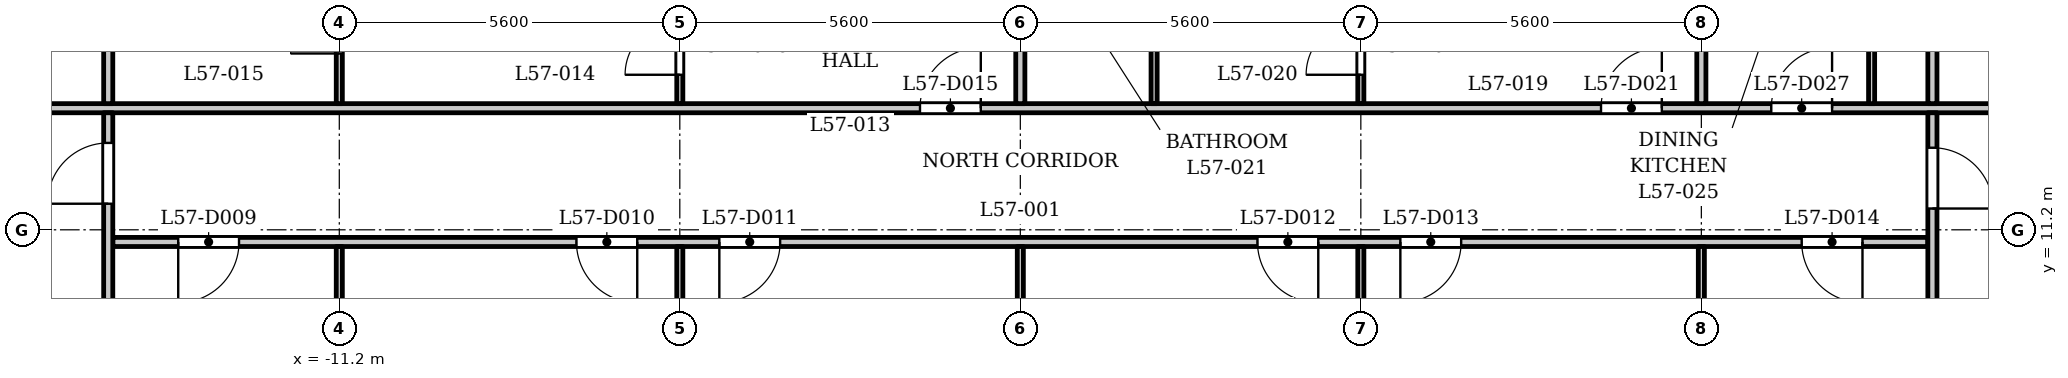
"""IFC4 building model, lengths in metres.
Left out: names, types, materials, properties, quantities, classifications, styles, units other than length and angle.
Written with IfcOpenShell. Run it as: python <this file> out.ifc"""

import sys

from ifc_helpers import new_model, si_unit, direction, frame, frame_2d, origin, place, context, subcontext, project, spatial, rectangle, extrude, element, fill, save


model = new_model("IFC4")
c1 = context("Model", 3, precision=1e-05, world=origin(), true_north=direction((0.0, 1.0)))
c2 = subcontext(c1, "Body", "Model", "MODEL_VIEW")
j1 = project(units=[si_unit("LENGTHUNIT", "METRE"), si_unit("PLANEANGLEUNIT", "RADIAN")], contexts=[c1])
p1 = place(None, origin())
s1 = spatial("IfcSite", under=j1, at=p1, CompositionType="ELEMENT")
p2 = place(p1, origin())
s2 = spatial("IfcBuilding", under=s1, at=p2, CompositionType="ELEMENT")
p3 = place(p2, frame((0.0, 0.0, 220.4)))
s3 = spatial("IfcBuildingStorey", under=s2, at=p3, CompositionType="ELEMENT", Elevation=220.4)
p4 = place(p3, frame((-14.925, 11.0, 0.0), z_axis=(0.0, 0.0, 1.0), x_axis=(1.0, 0.0, 0.0)))
e1 = element("IfcWall", 1, at=p4, inside=s3, PredefinedType="PARTITIONING", context=c2, shape_type="SweptSolid", body=[
    extrude(rectangle(XDim=29.85, YDim=0.15, at=frame_2d((14.925, 0.0))), origin(), (0.0, 0.0, 1.0), 3.2),
])
p5 = place(p4, frame((1.076, 0.0, 0.0)))
e2 = element("IfcOpeningElement", 2, at=p5, cuts=e1, PredefinedType="OPENING", context=c2, shape_type="SweptSolid", body=[
    extrude(rectangle(XDim=1.0, YDim=2.1, at=frame_2d((0.5, 1.05))), frame((0.0, 0.085, 0.0), z_axis=(0.0, -1.0, 0.0), x_axis=(1.0, 0.0, 0.0)), (0.0, 0.0, 1.0), 0.17),
])
p6 = place(p4, frame((7.625, 0.0, 0.0)))
e3 = element("IfcOpeningElement", 3, at=p6, cuts=e1, PredefinedType="OPENING", context=c2, shape_type="SweptSolid", body=[
    extrude(rectangle(XDim=1.0, YDim=2.1, at=frame_2d((0.5, 1.05))), frame((0.0, 0.085, 0.0), z_axis=(0.0, -1.0, 0.0), x_axis=(1.0, 0.0, 0.0)), (0.0, 0.0, 1.0), 0.17),
])
p7 = place(p4, frame((9.975, 0.0, 0.0)))
e4 = element("IfcOpeningElement", 4, at=p7, cuts=e1, PredefinedType="OPENING", context=c2, shape_type="SweptSolid", body=[
    extrude(rectangle(XDim=1.0, YDim=2.1, at=frame_2d((0.5, 1.05))), frame((0.0, 0.085, 0.0), z_axis=(0.0, -1.0, 0.0), x_axis=(1.0, 0.0, 0.0)), (0.0, 0.0, 1.0), 0.17),
])
p8 = place(p4, frame((18.825, 0.0, 0.0)))
e5 = element("IfcOpeningElement", 5, at=p8, cuts=e1, PredefinedType="OPENING", context=c2, shape_type="SweptSolid", body=[
    extrude(rectangle(XDim=1.0, YDim=2.1, at=frame_2d((0.5, 1.05))), frame((0.0, 0.085, 0.0), z_axis=(0.0, -1.0, 0.0), x_axis=(1.0, 0.0, 0.0)), (0.0, 0.0, 1.0), 0.17),
])
p9 = place(p4, frame((21.175, 0.0, 0.0)))
e6 = element("IfcOpeningElement", 6, at=p9, cuts=e1, PredefinedType="OPENING", context=c2, shape_type="SweptSolid", body=[
    extrude(rectangle(XDim=1.0, YDim=2.1, at=frame_2d((0.5, 1.05))), frame((0.0, 0.085, 0.0), z_axis=(0.0, -1.0, 0.0), x_axis=(1.0, 0.0, 0.0)), (0.0, 0.0, 1.0), 0.17),
])
p10 = place(p4, frame((27.775, 0.0, 0.0)))
e7 = element("IfcOpeningElement", 7, at=p10, cuts=e1, PredefinedType="OPENING", context=c2, shape_type="SweptSolid", body=[
    extrude(rectangle(XDim=1.0, YDim=2.1, at=frame_2d((0.5, 1.05))), frame((0.0, 0.085, 0.0), z_axis=(0.0, -1.0, 0.0), x_axis=(1.0, 0.0, 0.0)), (0.0, 0.0, 1.0), 0.17),
])
p11 = place(p3, frame((-17.4, 13.2, 0.0), z_axis=(0.0, 0.0, 1.0), x_axis=(1.0, 0.0, 0.0)))
e8 = element("IfcWall", 8, at=p11, inside=s3, PredefinedType="PARTITIONING", context=c2, shape_type="SweptSolid", body=[
    extrude(rectangle(XDim=34.8, YDim=0.15, at=frame_2d((17.4, 0.0))), origin(), (0.0, 0.0, 1.0), 3.2),
])
p12 = place(p11, frame((0.25, 0.0, 0.0)))
e9 = element("IfcOpeningElement", 9, at=p12, cuts=e8, PredefinedType="OPENING", context=c2, shape_type="SweptSolid", body=[
    extrude(rectangle(XDim=1.0, YDim=2.1, at=frame_2d((0.5, 1.05))), frame((0.0, 0.085, 0.0), z_axis=(0.0, -1.0, 0.0), x_axis=(1.0, 0.0, 0.0)), (0.0, 0.0, 1.0), 0.17),
])
p13 = place(p11, frame((33.65, 0.0, 0.0)))
e10 = element("IfcOpeningElement", 10, at=p13, cuts=e8, PredefinedType="OPENING", context=c2, shape_type="SweptSolid", body=[
    extrude(rectangle(XDim=1.0, YDim=2.1, at=frame_2d((0.5, 1.05))), frame((0.0, 0.085, 0.0), z_axis=(0.0, -1.0, 0.0), x_axis=(1.0, 0.0, 0.0)), (0.0, 0.0, 1.0), 0.17),
])
p14 = place(p11, frame((15.75, 0.0, 0.0)))
e11 = element("IfcOpeningElement", 11, at=p14, cuts=e8, PredefinedType="OPENING", context=c2, shape_type="SweptSolid", body=[
    extrude(rectangle(XDim=1.0, YDim=2.1, at=frame_2d((0.5, 1.05))), frame((0.0, 0.085, 0.0), z_axis=(0.0, -1.0, 0.0), x_axis=(1.0, 0.0, 0.0)), (0.0, 0.0, 1.0), 0.17),
])
p15 = place(p11, frame((26.95, 0.0, 0.0)))
e12 = element("IfcOpeningElement", 12, at=p15, cuts=e8, PredefinedType="OPENING", context=c2, shape_type="SweptSolid", body=[
    extrude(rectangle(XDim=1.0, YDim=2.1, at=frame_2d((0.5, 1.05))), frame((0.0, 0.085, 0.0), z_axis=(0.0, -1.0, 0.0), x_axis=(1.0, 0.0, 0.0)), (0.0, 0.0, 1.0), 0.17),
])
p16 = place(p11, frame((29.75, 0.0, 0.0)))
e13 = element("IfcOpeningElement", 13, at=p16, cuts=e8, PredefinedType="OPENING", context=c2, shape_type="SweptSolid", body=[
    extrude(rectangle(XDim=1.0, YDim=2.1, at=frame_2d((0.5, 1.05))), frame((0.0, 0.085, 0.0), z_axis=(0.0, -1.0, 0.0), x_axis=(1.0, 0.0, 0.0)), (0.0, 0.0, 1.0), 0.17),
])
p17 = place(p3, frame((-15.0, 6.769, 0.0), z_axis=(0.0, 0.0, 1.0), x_axis=(0.0, 1.0, 0.0)))
e14 = element("IfcWall", 14, at=p17, inside=s3, PredefinedType="PARTITIONING", context=c2, shape_type="SweptSolid", body=[
    extrude(rectangle(XDim=6.356, YDim=0.15, at=frame_2d((3.178, 0.0))), origin(), (0.0, 0.0, 1.0), 3.2),
])
p18 = place(p17, frame((4.86, 0.0, 0.0)))
e15 = element("IfcOpeningElement", 15, at=p18, cuts=e14, PredefinedType="OPENING", context=c2, shape_type="SweptSolid", body=[
    extrude(rectangle(XDim=1.0, YDim=2.1, at=frame_2d((0.5, 1.05))), frame((0.0, 0.085, 0.0), z_axis=(0.0, -1.0, 0.0), x_axis=(1.0, 0.0, 0.0)), (0.0, 0.0, 1.0), 0.17),
])
p19 = place(p3, frame((-15.0, 13.275, 0.0), z_axis=(0.0, 0.0, 1.0), x_axis=(0.0, 1.0, 0.0)))
e16 = element("IfcWall", 16, at=p19, inside=s3, PredefinedType="PARTITIONING", context=c2, shape_type="SweptSolid", body=[
    extrude(rectangle(XDim=2.05, YDim=0.15, at=frame_2d((1.025, 0.0))), origin(), (0.0, 0.0, 1.0), 3.2),
])
p20 = place(p3, frame((-11.2, 7.32, 0.0), z_axis=(0.0, 0.0, 1.0), x_axis=(0.0, 1.0, 0.0)))
e17 = element("IfcWall", 17, at=p20, inside=s3, PredefinedType="PARTITIONING", context=c2, shape_type="SweptSolid", body=[
    extrude(rectangle(XDim=3.605, YDim=0.1, at=frame_2d((1.802, 0.0))), origin(), (0.0, 0.0, 1.0), 3.2),
])
p21 = place(p3, frame((-11.2, 13.275, 0.0), z_axis=(0.0, 0.0, 1.0), x_axis=(0.0, 1.0, 0.0)))
e18 = element("IfcWall", 18, at=p21, inside=s3, PredefinedType="PARTITIONING", context=c2, shape_type="SweptSolid", body=[
    extrude(rectangle(XDim=3.475, YDim=0.1, at=frame_2d((1.738, 0.0))), origin(), (0.0, 0.0, 1.0), 3.2),
])
p22 = place(p21, frame((0.825, 0.0, 0.0)))
e19 = element("IfcOpeningElement", 19, at=p22, cuts=e18, PredefinedType="OPENING", context=c2, shape_type="SweptSolid", body=[
    extrude(rectangle(XDim=0.8, YDim=2.1, at=frame_2d((0.4, 1.05))), frame((0.0, 0.06, 0.0), z_axis=(0.0, -1.0, 0.0), x_axis=(1.0, 0.0, 0.0)), (0.0, 0.0, 1.0), 0.12),
])
p23 = place(p3, frame((-5.6, 7.32, 0.0), z_axis=(0.0, 0.0, 1.0), x_axis=(0.0, 1.0, 0.0)))
e20 = element("IfcWall", 20, at=p23, inside=s3, PredefinedType="PARTITIONING", context=c2, shape_type="SweptSolid", body=[
    extrude(rectangle(XDim=3.605, YDim=0.1, at=frame_2d((1.802, 0.0))), origin(), (0.0, 0.0, 1.0), 3.2),
])
p24 = place(p3, frame((-5.6, 13.275, 0.0), z_axis=(0.0, 0.0, 1.0), x_axis=(0.0, 1.0, 0.0)))
e21 = element("IfcWall", 21, at=p24, inside=s3, PredefinedType="PARTITIONING", context=c2, shape_type="SweptSolid", body=[
    extrude(rectangle(XDim=3.475, YDim=0.1, at=frame_2d((1.738, 0.0))), origin(), (0.0, 0.0, 1.0), 3.2),
])
p25 = place(p24, frame((0.475, 0.0, 0.0)))
e22 = element("IfcOpeningElement", 22, at=p25, cuts=e21, PredefinedType="OPENING", context=c2, shape_type="SweptSolid", body=[
    extrude(rectangle(XDim=0.9, YDim=2.1, at=frame_2d((0.45, 1.05))), frame((0.0, 0.06, 0.0), z_axis=(0.0, -1.0, 0.0), x_axis=(1.0, 0.0, 0.0)), (0.0, 0.0, 1.0), 0.12),
])
p26 = place(p3, frame((0.0, 7.32, 0.0), z_axis=(0.0, 0.0, 1.0), x_axis=(0.0, 1.0, 0.0)))
e23 = element("IfcWall", 23, at=p26, inside=s3, PredefinedType="PARTITIONING", context=c2, shape_type="SweptSolid", body=[
    extrude(rectangle(XDim=3.605, YDim=0.1, at=frame_2d((1.802, 0.0))), origin(), (0.0, 0.0, 1.0), 3.2),
])
p27 = place(p3, frame((0.0, 13.275, 0.0), z_axis=(0.0, 0.0, 1.0), x_axis=(0.0, 1.0, 0.0)))
e24 = element("IfcWall", 24, at=p27, inside=s3, PredefinedType="PARTITIONING", context=c2, shape_type="SweptSolid", body=[
    extrude(rectangle(XDim=3.475, YDim=0.15, at=frame_2d((1.738, 0.0))), origin(), (0.0, 0.0, 1.0), 3.2),
])
p28 = place(p3, frame((2.2, 13.275, 0.0), z_axis=(0.0, 0.0, 1.0), x_axis=(0.0, 1.0, 0.0)))
e25 = element("IfcWall", 25, at=p28, inside=s3, PredefinedType="PARTITIONING", context=c2, shape_type="SweptSolid", body=[
    extrude(rectangle(XDim=3.475, YDim=0.1, at=frame_2d((1.738, 0.0))), origin(), (0.0, 0.0, 1.0), 3.2),
])
p29 = place(p3, frame((5.6, 7.32, 0.0), z_axis=(0.0, 0.0, 1.0), x_axis=(0.0, 1.0, 0.0)))
e26 = element("IfcWall", 26, at=p29, inside=s3, PredefinedType="PARTITIONING", context=c2, shape_type="SweptSolid", body=[
    extrude(rectangle(XDim=3.605, YDim=0.1, at=frame_2d((1.802, 0.0))), origin(), (0.0, 0.0, 1.0), 3.2),
])
p30 = place(p3, frame((5.6, 13.275, 0.0), z_axis=(0.0, 0.0, 1.0), x_axis=(0.0, 1.0, 0.0)))
e27 = element("IfcWall", 27, at=p30, inside=s3, PredefinedType="PARTITIONING", context=c2, shape_type="SweptSolid", body=[
    extrude(rectangle(XDim=3.475, YDim=0.1, at=frame_2d((1.738, 0.0))), origin(), (0.0, 0.0, 1.0), 3.2),
])
p31 = place(p30, frame((0.475, 0.0, 0.0)))
e28 = element("IfcOpeningElement", 28, at=p31, cuts=e27, PredefinedType="OPENING", context=c2, shape_type="SweptSolid", body=[
    extrude(rectangle(XDim=0.9, YDim=2.1, at=frame_2d((0.45, 1.05))), frame((0.0, 0.06, 0.0), z_axis=(0.0, -1.0, 0.0), x_axis=(1.0, 0.0, 0.0)), (0.0, 0.0, 1.0), 0.12),
])
p32 = place(p3, frame((11.2, 7.32, 0.0), z_axis=(0.0, 0.0, 1.0), x_axis=(0.0, 1.0, 0.0)))
e29 = element("IfcWall", 29, at=p32, inside=s3, PredefinedType="PARTITIONING", context=c2, shape_type="SweptSolid", body=[
    extrude(rectangle(XDim=3.605, YDim=0.1, at=frame_2d((1.802, 0.0))), origin(), (0.0, 0.0, 1.0), 3.2),
])
p33 = place(p3, frame((11.2, 13.275, 0.0), z_axis=(0.0, 0.0, 1.0), x_axis=(0.0, 1.0, 0.0)))
e30 = element("IfcWall", 30, at=p33, inside=s3, PredefinedType="PARTITIONING", context=c2, shape_type="SweptSolid", body=[
    extrude(rectangle(XDim=3.475, YDim=0.15, at=frame_2d((1.738, 0.0))), origin(), (0.0, 0.0, 1.0), 3.2),
])
p34 = place(p3, frame((14.0, 13.275, 0.0), z_axis=(0.0, 0.0, 1.0), x_axis=(0.0, 1.0, 0.0)))
e31 = element("IfcWall", 31, at=p34, inside=s3, PredefinedType="PARTITIONING", context=c2, shape_type="SweptSolid", body=[
    extrude(rectangle(XDim=3.475, YDim=0.1, at=frame_2d((1.738, 0.0))), origin(), (0.0, 0.0, 1.0), 3.2),
])
p35 = place(p3, frame((15.0, 6.769, 0.0), z_axis=(0.0, 0.0, 1.0), x_axis=(0.0, 1.0, 0.0)))
e32 = element("IfcWall", 32, at=p35, inside=s3, PredefinedType="PARTITIONING", context=c2, shape_type="SweptSolid", body=[
    extrude(rectangle(XDim=6.356, YDim=0.15, at=frame_2d((3.178, 0.0))), origin(), (0.0, 0.0, 1.0), 3.2),
])
p36 = place(p35, frame((4.781, 0.0, 0.0)))
e33 = element("IfcOpeningElement", 33, at=p36, cuts=e32, PredefinedType="OPENING", context=c2, shape_type="SweptSolid", body=[
    extrude(rectangle(XDim=1.0, YDim=2.1, at=frame_2d((0.5, 1.05))), frame((0.0, 0.085, 0.0), z_axis=(0.0, -1.0, 0.0), x_axis=(1.0, 0.0, 0.0)), (0.0, 0.0, 1.0), 0.17),
])
p37 = place(p3, frame((15.0, 13.275, 0.0), z_axis=(0.0, 0.0, 1.0), x_axis=(0.0, 1.0, 0.0)))
e34 = element("IfcWall", 34, at=p37, inside=s3, PredefinedType="PARTITIONING", context=c2, shape_type="SweptSolid", body=[
    extrude(rectangle(XDim=2.05, YDim=0.15, at=frame_2d((1.025, 0.0))), origin(), (0.0, 0.0, 1.0), 3.2),
])
p38 = place(p18, origin())
e35 = element("IfcDoor", 35, at=p38, inside=s3, OperationType="SINGLE_SWING_RIGHT", PredefinedType="DOOR", context=c2, shape_type="SweptSolid", body=[
    extrude(rectangle(XDim=1.0, YDim=2.1, at=frame_2d((0.5, 1.05))), frame((0.0, 0.025, 0.0), z_axis=(0.0, -1.0, 0.0), x_axis=(1.0, 0.0, 0.0)), (0.0, 0.0, 1.0), 0.05),
])
fill(e15, e35)
p39 = place(p36, origin())
e36 = element("IfcDoor", 36, at=p39, inside=s3, OperationType="SINGLE_SWING_LEFT", PredefinedType="DOOR", context=c2, shape_type="SweptSolid", body=[
    extrude(rectangle(XDim=1.0, YDim=2.1, at=frame_2d((0.5, 1.05))), frame((0.0, 0.025, 0.0), z_axis=(0.0, -1.0, 0.0), x_axis=(1.0, 0.0, 0.0)), (0.0, 0.0, 1.0), 0.05),
])
fill(e33, e36)
p40 = place(p5, origin())
e37 = element("IfcDoor", 37, at=p40, inside=s3, OperationType="SINGLE_SWING_LEFT", PredefinedType="DOOR", context=c2, shape_type="SweptSolid", body=[
    extrude(rectangle(XDim=1.0, YDim=2.1, at=frame_2d((0.5, 1.05))), frame((0.0, 0.025, 0.0), z_axis=(0.0, -1.0, 0.0), x_axis=(1.0, 0.0, 0.0)), (0.0, 0.0, 1.0), 0.05),
])
fill(e2, e37)
p41 = place(p6, origin())
e38 = element("IfcDoor", 38, at=p41, inside=s3, OperationType="SINGLE_SWING_RIGHT", PredefinedType="DOOR", context=c2, shape_type="SweptSolid", body=[
    extrude(rectangle(XDim=1.0, YDim=2.1, at=frame_2d((0.5, 1.05))), frame((0.0, 0.025, 0.0), z_axis=(0.0, -1.0, 0.0), x_axis=(1.0, 0.0, 0.0)), (0.0, 0.0, 1.0), 0.05),
])
fill(e3, e38)
p42 = place(p7, origin())
e39 = element("IfcDoor", 39, at=p42, inside=s3, OperationType="SINGLE_SWING_LEFT", PredefinedType="DOOR", context=c2, shape_type="SweptSolid", body=[
    extrude(rectangle(XDim=1.0, YDim=2.1, at=frame_2d((0.5, 1.05))), frame((0.0, 0.025, 0.0), z_axis=(0.0, -1.0, 0.0), x_axis=(1.0, 0.0, 0.0)), (0.0, 0.0, 1.0), 0.05),
])
fill(e4, e39)
p43 = place(p8, origin())
e40 = element("IfcDoor", 40, at=p43, inside=s3, OperationType="SINGLE_SWING_RIGHT", PredefinedType="DOOR", context=c2, shape_type="SweptSolid", body=[
    extrude(rectangle(XDim=1.0, YDim=2.1, at=frame_2d((0.5, 1.05))), frame((0.0, 0.025, 0.0), z_axis=(0.0, -1.0, 0.0), x_axis=(1.0, 0.0, 0.0)), (0.0, 0.0, 1.0), 0.05),
])
fill(e5, e40)
p44 = place(p9, origin())
e41 = element("IfcDoor", 41, at=p44, inside=s3, OperationType="SINGLE_SWING_LEFT", PredefinedType="DOOR", context=c2, shape_type="SweptSolid", body=[
    extrude(rectangle(XDim=1.0, YDim=2.1, at=frame_2d((0.5, 1.05))), frame((0.0, 0.025, 0.0), z_axis=(0.0, -1.0, 0.0), x_axis=(1.0, 0.0, 0.0)), (0.0, 0.0, 1.0), 0.05),
])
fill(e6, e41)
p45 = place(p10, origin())
e42 = element("IfcDoor", 42, at=p45, inside=s3, OperationType="SINGLE_SWING_RIGHT", PredefinedType="DOOR", context=c2, shape_type="SweptSolid", body=[
    extrude(rectangle(XDim=1.0, YDim=2.1, at=frame_2d((0.5, 1.05))), frame((0.0, 0.025, 0.0), z_axis=(0.0, -1.0, 0.0), x_axis=(1.0, 0.0, 0.0)), (0.0, 0.0, 1.0), 0.05),
])
fill(e7, e42)
p46 = place(p14, origin())
e43 = element("IfcDoor", 43, at=p46, inside=s3, OperationType="SINGLE_SWING_LEFT", PredefinedType="DOOR", context=c2, shape_type="SweptSolid", body=[
    extrude(rectangle(XDim=1.0, YDim=2.1, at=frame_2d((0.5, 1.05))), frame((0.0, 0.025, 0.0), z_axis=(0.0, -1.0, 0.0), x_axis=(1.0, 0.0, 0.0)), (0.0, 0.0, 1.0), 0.05),
])
fill(e11, e43)
p47 = place(p25, origin())
e44 = element("IfcDoor", 44, at=p47, inside=s3, OperationType="SINGLE_SWING_RIGHT", PredefinedType="DOOR", context=c2, shape_type="SweptSolid", body=[
    extrude(rectangle(XDim=0.9, YDim=2.1, at=frame_2d((0.45, 1.05))), frame((0.0, 0.025, 0.0), z_axis=(0.0, -1.0, 0.0), x_axis=(1.0, 0.0, 0.0)), (0.0, 0.0, 1.0), 0.05),
])
fill(e22, e44)
p48 = place(p22, origin())
e45 = element("IfcDoor", 45, at=p48, inside=s3, OperationType="SINGLE_SWING_RIGHT", PredefinedType="DOOR", context=c2, shape_type="SweptSolid", body=[
    extrude(rectangle(XDim=0.8, YDim=2.1, at=frame_2d((0.4, 1.05))), frame((0.0, 0.025, 0.0), z_axis=(0.0, -1.0, 0.0), x_axis=(1.0, 0.0, 0.0)), (0.0, 0.0, 1.0), 0.05),
])
fill(e19, e45)
p49 = place(p15, origin())
e46 = element("IfcDoor", 46, at=p49, inside=s3, OperationType="SINGLE_SWING_LEFT", PredefinedType="DOOR", context=c2, shape_type="SweptSolid", body=[
    extrude(rectangle(XDim=1.0, YDim=2.1, at=frame_2d((0.5, 1.05))), frame((0.0, 0.025, 0.0), z_axis=(0.0, -1.0, 0.0), x_axis=(1.0, 0.0, 0.0)), (0.0, 0.0, 1.0), 0.05),
])
fill(e12, e46)
p50 = place(p31, origin())
e47 = element("IfcDoor", 47, at=p50, inside=s3, OperationType="SINGLE_SWING_RIGHT", PredefinedType="DOOR", context=c2, shape_type="SweptSolid", body=[
    extrude(rectangle(XDim=0.9, YDim=2.1, at=frame_2d((0.45, 1.05))), frame((0.0, 0.025, 0.0), z_axis=(0.0, -1.0, 0.0), x_axis=(1.0, 0.0, 0.0)), (0.0, 0.0, 1.0), 0.05),
])
fill(e28, e47)
p51 = place(p16, origin())
e48 = element("IfcDoor", 48, at=p51, inside=s3, OperationType="SINGLE_SWING_LEFT", PredefinedType="DOOR", context=c2, shape_type="SweptSolid", body=[
    extrude(rectangle(XDim=1.0, YDim=2.1, at=frame_2d((0.5, 1.05))), frame((0.0, 0.025, 0.0), z_axis=(0.0, -1.0, 0.0), x_axis=(1.0, 0.0, 0.0)), (0.0, 0.0, 1.0), 0.05),
])
fill(e13, e48)
save(model, sys.argv[1])
